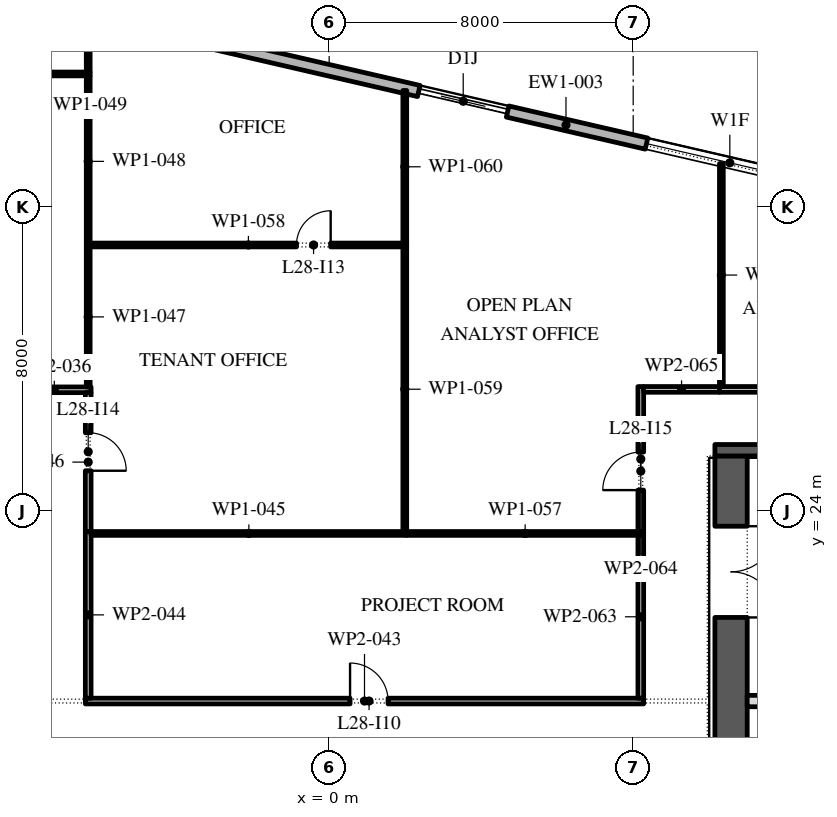
"""IFC4 building model, lengths in metres.
Left out: names, types, materials, properties, quantities, classifications, styles, units other than length and angle.
Written with IfcOpenShell. Run it as: python <this file> out.ifc"""

import sys

from ifc_helpers import new_model, si_unit, direction, frame, frame_2d, origin, place, context, subcontext, project, spatial, rectangle, extrude, element, fill, save


model = new_model("IFC4")
c1 = context("Model", 3, precision=1e-05, world=origin(), true_north=direction((0.0, 1.0)))
c2 = subcontext(c1, "Body", "Model", "MODEL_VIEW")
j1 = project(units=[si_unit("LENGTHUNIT", "METRE"), si_unit("PLANEANGLEUNIT", "RADIAN")], contexts=[c1])
p1 = place(None, origin())
s1 = spatial("IfcSite", under=j1, at=p1, CompositionType="ELEMENT")
p2 = place(p1, origin())
s2 = spatial("IfcBuilding", under=s1, at=p2, CompositionType="ELEMENT")
p3 = place(p2, frame((0.0, 0.0, 130.8)))
s3 = spatial("IfcBuildingStorey", under=s2, at=p3, CompositionType="ELEMENT", Elevation=130.8)
p4 = place(p3, frame((31.078, 28.421, 0.0), z_axis=(0.0, 0.0, 1.0), x_axis=(-0.974370456532, 0.224949357493, 0.0)))
e1 = element("IfcWall", 1, at=p4, inside=s3, PredefinedType="STANDARD", context=c2, shape_type="SweptSolid", body=[
    extrude(rectangle(XDim=51.0, YDim=0.3, at=frame_2d((25.5, 0.0))), origin(), (0.0, 0.0, 1.0), 4.0),
])
p5 = place(p4, frame((1.875, 0.0, 0.45)))
e2 = element("IfcOpeningElement", 2, at=p5, cuts=e1, PredefinedType="OPENING", context=c2, shape_type="SweptSolid", body=[
    extrude(rectangle(XDim=4.5, YDim=2.95, at=frame_2d((2.25, 1.475))), frame((0.0, 0.16, 0.0), z_axis=(0.0, -1.0, 0.0), x_axis=(1.0, 0.0, 0.0)), (0.0, 0.0, 1.0), 0.32),
])
p6 = place(p4, frame((10.275, 0.0, 0.45)))
e3 = element("IfcOpeningElement", 3, at=p6, cuts=e1, PredefinedType="OPENING", context=c2, shape_type="SweptSolid", body=[
    extrude(rectangle(XDim=4.5, YDim=2.825, at=frame_2d((2.25, 1.413))), frame((0.0, 0.16, 0.0), z_axis=(0.0, -1.0, 0.0), x_axis=(1.0, 0.0, 0.0)), (0.0, 0.0, 1.0), 0.32),
])
p7 = place(p4, frame((18.825, 0.0, 0.45)))
e4 = element("IfcOpeningElement", 4, at=p7, cuts=e1, PredefinedType="OPENING", context=c2, shape_type="SweptSolid", body=[
    extrude(rectangle(XDim=4.5, YDim=2.8, at=frame_2d((2.25, 1.4))), frame((0.0, 0.16, 0.0), z_axis=(0.0, -1.0, 0.0), x_axis=(1.0, 0.0, 0.0)), (0.0, 0.0, 1.0), 0.32),
])
p8 = place(p4, frame((27.075, 0.0, 0.0)))
e5 = element("IfcOpeningElement", 5, at=p8, cuts=e1, PredefinedType="OPENING", context=c2, shape_type="SweptSolid", body=[
    extrude(rectangle(XDim=2.4, YDim=3.125, at=frame_2d((1.2, 1.562))), frame((0.0, 0.16, 0.0), z_axis=(0.0, -1.0, 0.0), x_axis=(1.0, 0.0, 0.0)), (0.0, 0.0, 1.0), 0.32),
])
p9 = place(p4, frame((35.925, 0.0, 0.45)))
e6 = element("IfcOpeningElement", 6, at=p9, cuts=e1, PredefinedType="OPENING", context=c2, shape_type="SweptSolid", body=[
    extrude(rectangle(XDim=4.5, YDim=2.575, at=frame_2d((2.25, 1.288))), frame((0.0, 0.16, 0.0), z_axis=(0.0, -1.0, 0.0), x_axis=(1.0, 0.0, 0.0)), (0.0, 0.0, 1.0), 0.32),
])
p10 = place(p4, frame((44.475, 0.0, 0.45)))
e7 = element("IfcOpeningElement", 7, at=p10, cuts=e1, PredefinedType="OPENING", context=c2, shape_type="SweptSolid", body=[
    extrude(rectangle(XDim=4.5, YDim=2.45, at=frame_2d((2.25, 1.225))), frame((0.0, 0.16, 0.0), z_axis=(0.0, -1.0, 0.0), x_axis=(1.0, 0.0, 0.0)), (0.0, 0.0, 1.0), 0.32),
])
p11 = place(p3, frame((10.575, -2.45, 0.0), z_axis=(0.0, 0.0, 1.0), x_axis=(0.0, 1.0, 0.0)))
e8 = element("IfcWall", 8, at=p11, inside=s3, PredefinedType="SHEAR", context=c2, shape_type="SweptSolid", body=[
    extrude(rectangle(XDim=27.9, YDim=0.85, at=frame_2d((13.95, 0.0))), origin(), (0.0, 0.0, 1.0), 4.0),
])
p12 = place(p11, frame((23.65, 0.0, 0.0)))
e9 = element("IfcOpeningElement", 9, at=p12, cuts=e8, PredefinedType="OPENING", context=c2, shape_type="SweptSolid", body=[
    extrude(rectangle(XDim=2.4, YDim=2.1, at=frame_2d((1.2, 1.05))), frame((0.0, 0.435, 0.0), z_axis=(0.0, -1.0, 0.0), x_axis=(1.0, 0.0, 0.0)), (0.0, 0.0, 1.0), 0.87),
])
p13 = place(p11, frame((1.087, 0.0, 0.0)))
e10 = element("IfcOpeningElement", 10, at=p13, cuts=e8, PredefinedType="OPENING", context=c2, shape_type="SweptSolid", body=[
    extrude(rectangle(XDim=0.9, YDim=2.1, at=frame_2d((0.45, 1.05))), frame((0.0, 0.435, 0.0), z_axis=(0.0, -1.0, 0.0), x_axis=(1.0, 0.0, 0.0)), (0.0, 0.0, 1.0), 0.87),
])
p14 = place(p11, frame((4.262, 0.0, 0.0)))
e11 = element("IfcOpeningElement", 11, at=p14, cuts=e8, PredefinedType="OPENING", context=c2, shape_type="SweptSolid", body=[
    extrude(rectangle(XDim=1.0, YDim=2.1, at=frame_2d((0.5, 1.05))), frame((0.0, 0.435, 0.0), z_axis=(0.0, -1.0, 0.0), x_axis=(1.0, 0.0, 0.0)), (0.0, 0.0, 1.0), 0.87),
])
p15 = place(p3, frame((10.15, 25.6, 0.0), z_axis=(0.0, 0.0, 1.0), x_axis=(1.0, 0.0, 0.0)))
e12 = element("IfcWall", 12, at=p15, inside=s3, PredefinedType="SHEAR", context=c2, shape_type="SweptSolid", body=[
    extrude(rectangle(XDim=11.7, YDim=0.3, at=frame_2d((5.85, 0.0))), origin(), (0.0, 0.0, 1.0), 4.0),
])
p16 = place(p3, frame((11.0, 19.0, 0.0), z_axis=(0.0, 0.0, 1.0), x_axis=(1.0, 0.0, 0.0)))
e13 = element("IfcWall", 13, at=p16, inside=s3, PredefinedType="PARTITIONING", context=c2, shape_type="SweptSolid", body=[
    extrude(rectangle(XDim=3.0, YDim=0.3, at=frame_2d((1.5, 0.0))), origin(), (0.0, 0.0, 1.0), 4.0),
])
p17 = place(p3, frame((-14.62, 35.5, 0.0), z_axis=(0.0, 0.0, 1.0), x_axis=(1.0, 0.0, 0.0)))
e14 = element("IfcWall", 14, at=p17, inside=s3, PredefinedType="PARTITIONING", context=c2, shape_type="SweptSolid", body=[
    extrude(rectangle(XDim=8.33, YDim=0.1, at=frame_2d((4.165, 0.0))), origin(), (0.0, 0.0, 1.0), 4.0),
])
p18 = place(p17, frame((5.43, 0.0, 0.0)))
e15 = element("IfcOpeningElement", 15, at=p18, cuts=e14, PredefinedType="OPENING", context=c2, shape_type="SweptSolid", body=[
    extrude(rectangle(XDim=0.9, YDim=2.1, at=frame_2d((0.45, 1.05))), frame((0.0, 0.06, 0.0), z_axis=(0.0, -1.0, 0.0), x_axis=(1.0, 0.0, 0.0)), (0.0, 0.0, 1.0), 0.12),
])
p19 = place(p3, frame((-8.2, 27.19, 0.0), z_axis=(0.0, 0.0, 1.0), x_axis=(1.0, 0.0, 0.0)))
e16 = element("IfcWall", 16, at=p19, inside=s3, PredefinedType="PARTITIONING", context=c2, shape_type="SweptSolid", body=[
    extrude(rectangle(XDim=1.935, YDim=0.15, at=frame_2d((0.968, 0.0))), origin(), (0.0, 0.0, 1.0), 4.0),
])
p20 = place(p3, frame((-6.415, 19.0, 0.0), z_axis=(0.0, 0.0, 1.0), x_axis=(1.0, 0.0, 0.0)))
e17 = element("IfcWall", 17, at=p20, inside=s3, PredefinedType="PARTITIONING", context=c2, shape_type="SweptSolid", body=[
    extrude(rectangle(XDim=14.69, YDim=0.15, at=frame_2d((7.345, 0.0))), origin(), (0.0, 0.0, 1.0), 4.0),
])
p21 = place(p20, frame((6.965, 0.0, 0.0)))
e18 = element("IfcOpeningElement", 18, at=p21, cuts=e17, PredefinedType="OPENING", context=c2, shape_type="SweptSolid", body=[
    extrude(rectangle(XDim=1.0, YDim=2.1, at=frame_2d((0.5, 1.05))), frame((0.0, 0.085, 0.0), z_axis=(0.0, -1.0, 0.0), x_axis=(1.0, 0.0, 0.0)), (0.0, 0.0, 1.0), 0.17),
])
p22 = place(p3, frame((-6.34, 23.46, 0.0), z_axis=(0.0, 0.0, 1.0), x_axis=(0.0, -1.0, 0.0)))
e19 = element("IfcWall", 19, at=p22, inside=s3, PredefinedType="PARTITIONING", context=c2, shape_type="SweptSolid", body=[
    extrude(rectangle(XDim=4.385, YDim=0.15, at=frame_2d((2.192, 0.0))), origin(), (0.0, 0.0, 1.0), 4.0),
])
p23 = place(p3, frame((-6.265, 23.41, 0.0), z_axis=(0.0, 0.0, 1.0), x_axis=(1.0, 0.0, 0.0)))
e20 = element("IfcWall", 20, at=p23, inside=s3, PredefinedType="PARTITIONING", context=c2, shape_type="SweptSolid", body=[
    extrude(rectangle(XDim=8.305, YDim=0.1, at=frame_2d((4.152, 0.0))), origin(), (0.0, 0.0, 1.0), 4.0),
])
p24 = place(p3, frame((-6.34, 27.115, 0.0), z_axis=(0.0, 0.0, 1.0), x_axis=(0.0, -1.0, 0.0)))
e21 = element("IfcWall", 21, at=p24, inside=s3, PredefinedType="PARTITIONING", context=c2, shape_type="SweptSolid", body=[
    extrude(rectangle(XDim=3.655, YDim=0.15, at=frame_2d((1.828, 0.0))), origin(), (0.0, 0.0, 1.0), 4.0),
])
p25 = place(p24, frame((1.055, 0.0, 0.0)))
e22 = element("IfcOpeningElement", 22, at=p25, cuts=e21, PredefinedType="OPENING", context=c2, shape_type="SweptSolid", body=[
    extrude(rectangle(XDim=1.0, YDim=2.1, at=frame_2d((0.5, 1.05))), frame((0.0, 0.085, 0.0), z_axis=(0.0, -1.0, 0.0), x_axis=(1.0, 0.0, 0.0)), (0.0, 0.0, 1.0), 0.17),
])
p26 = place(p3, frame((-6.34, 27.265, 0.0), z_axis=(0.0, 0.0, 1.0), x_axis=(0.0, 1.0, 0.0)))
e23 = element("IfcWall", 23, at=p26, inside=s3, PredefinedType="PARTITIONING", context=c2, shape_type="SweptSolid", body=[
    extrude(rectangle(XDim=3.685, YDim=0.1, at=frame_2d((1.843, 0.0))), origin(), (0.0, 0.0, 1.0), 4.0),
])
p27 = place(p3, frame((-6.34, 30.95, 0.0), z_axis=(0.0, 0.0, 1.0), x_axis=(0.0, 1.0, 0.0)))
e24 = element("IfcWall", 24, at=p27, inside=s3, PredefinedType="PARTITIONING", context=c2, shape_type="SweptSolid", body=[
    extrude(rectangle(XDim=4.5, YDim=0.1, at=frame_2d((2.25, 0.0))), origin(), (0.0, 0.0, 1.0), 4.0),
])
p28 = place(p3, frame((-6.34, 35.55, 0.0), z_axis=(0.0, 0.0, 1.0), x_axis=(0.0, 1.0, 0.0)))
e25 = element("IfcWall", 25, at=p28, inside=s3, PredefinedType="PARTITIONING", context=c2, shape_type="SweptSolid", body=[
    extrude(rectangle(XDim=1.438, YDim=0.1, at=frame_2d((0.719, 0.0))), origin(), (0.0, 0.0, 1.0), 4.0),
])
p29 = place(p3, frame((2.04, 23.41, 0.0), z_axis=(0.0, 0.0, 1.0), x_axis=(1.0, 0.0, 0.0)))
e26 = element("IfcWall", 26, at=p29, inside=s3, PredefinedType="PARTITIONING", context=c2, shape_type="SweptSolid", body=[
    extrude(rectangle(XDim=6.235, YDim=0.1, at=frame_2d((3.117, 0.0))), origin(), (0.0, 0.0, 1.0), 4.0),
])
p30 = place(p3, frame((2.04, 31.0, 0.0), z_axis=(0.0, 0.0, 1.0), x_axis=(-1.0, 0.0, 0.0)))
e27 = element("IfcWall", 27, at=p30, inside=s3, PredefinedType="PARTITIONING", context=c2, shape_type="SweptSolid", body=[
    extrude(rectangle(XDim=8.33, YDim=0.1, at=frame_2d((4.165, 0.0))), origin(), (0.0, 0.0, 1.0), 4.0),
])
p31 = place(p30, frame((2.0, 0.0, 0.0)))
e28 = element("IfcOpeningElement", 28, at=p31, cuts=e27, PredefinedType="OPENING", context=c2, shape_type="SweptSolid", body=[
    extrude(rectangle(XDim=0.9, YDim=2.1, at=frame_2d((0.45, 1.05))), frame((0.0, 0.06, 0.0), z_axis=(0.0, -1.0, 0.0), x_axis=(1.0, 0.0, 0.0)), (0.0, 0.0, 1.0), 0.12),
])
p32 = place(p3, frame((1.99, 30.95, 0.0), z_axis=(0.0, 0.0, 1.0), x_axis=(0.0, -1.0, 0.0)))
e29 = element("IfcWall", 29, at=p32, inside=s3, PredefinedType="PARTITIONING", context=c2, shape_type="SweptSolid", body=[
    extrude(rectangle(XDim=7.49, YDim=0.1, at=frame_2d((3.745, 0.0))), origin(), (0.0, 0.0, 1.0), 4.0),
])
p33 = place(p3, frame((1.99, 35.065, 0.0), z_axis=(0.0, 0.0, 1.0), x_axis=(0.0, -1.0, 0.0)))
e30 = element("IfcWall", 30, at=p33, inside=s3, PredefinedType="PARTITIONING", context=c2, shape_type="SweptSolid", body=[
    extrude(rectangle(XDim=4.015, YDim=0.1, at=frame_2d((2.007, 0.0))), origin(), (0.0, 0.0, 1.0), 4.0),
])
p34 = place(p3, frame((8.2, 19.075, 0.0), z_axis=(0.0, 0.0, 1.0), x_axis=(0.0, 1.0, 0.0)))
e31 = element("IfcWall", 31, at=p34, inside=s3, PredefinedType="PARTITIONING", context=c2, shape_type="SweptSolid", body=[
    extrude(rectangle(XDim=4.285, YDim=0.15, at=frame_2d((2.143, 0.0))), origin(), (0.0, 0.0, 1.0), 4.0),
])
p35 = place(p3, frame((8.2, 23.46, 0.0), z_axis=(0.0, 0.0, 1.0), x_axis=(0.0, 1.0, 0.0)))
e32 = element("IfcWall", 32, at=p35, inside=s3, PredefinedType="PARTITIONING", context=c2, shape_type="SweptSolid", body=[
    extrude(rectangle(XDim=3.815, YDim=0.15, at=frame_2d((1.907, 0.0))), origin(), (0.0, 0.0, 1.0), 4.0),
])
p36 = place(p35, frame((1.09, 0.0, 0.0)))
e33 = element("IfcOpeningElement", 33, at=p36, cuts=e32, PredefinedType="OPENING", context=c2, shape_type="SweptSolid", body=[
    extrude(rectangle(XDim=1.0, YDim=2.1, at=frame_2d((0.5, 1.05))), frame((0.0, 0.085, 0.0), z_axis=(0.0, -1.0, 0.0), x_axis=(1.0, 0.0, 0.0)), (0.0, 0.0, 1.0), 0.17),
])
p37 = place(p3, frame((8.275, 27.2, 0.0), z_axis=(0.0, 0.0, 1.0), x_axis=(1.0, 0.0, 0.0)))
e34 = element("IfcWall", 34, at=p37, inside=s3, PredefinedType="PARTITIONING", context=c2, shape_type="SweptSolid", body=[
    extrude(rectangle(XDim=1.995, YDim=0.15, at=frame_2d((0.998, 0.0))), origin(), (0.0, 0.0, 1.0), 4.0),
])
p38 = place(p3, frame((10.27, 27.2, 0.0), z_axis=(0.0, 0.0, 1.0), x_axis=(1.0, 0.0, 0.0)))
e35 = element("IfcWall", 35, at=p38, inside=s3, PredefinedType="PARTITIONING", context=c2, shape_type="SweptSolid", body=[
    extrude(rectangle(XDim=12.79, YDim=0.15, at=frame_2d((6.395, 0.0))), origin(), (0.0, 0.0, 1.0), 4.0),
])
p39 = place(p38, frame((7.09, 0.0, 0.0)))
e36 = element("IfcOpeningElement", 36, at=p39, cuts=e35, PredefinedType="OPENING", context=c2, shape_type="SweptSolid", body=[
    extrude(rectangle(XDim=1.0, YDim=2.1, at=frame_2d((0.5, 1.05))), frame((0.0, 0.085, 0.0), z_axis=(0.0, -1.0, 0.0), x_axis=(1.0, 0.0, 0.0)), (0.0, 0.0, 1.0), 0.17),
])
p40 = place(p3, frame((10.32, 33.142, 0.0), z_axis=(0.0, 0.0, 1.0), x_axis=(0.0, -1.0, 0.0)))
e37 = element("IfcWall", 37, at=p40, inside=s3, PredefinedType="PARTITIONING", context=c2, shape_type="SweptSolid", body=[
    extrude(rectangle(XDim=5.867, YDim=0.1, at=frame_2d((2.934, 0.0))), origin(), (0.0, 0.0, 1.0), 4.0),
])
p41 = place(p7, origin())
e38 = element("IfcWindow", 38, at=p41, inside=s3, PartitioningType="DOUBLE_PANEL_VERTICAL", PredefinedType="WINDOW", context=c2, shape_type="SweptSolid", body=[
    extrude(rectangle(XDim=4.5, YDim=2.8, at=frame_2d((2.25, 1.4))), frame((0.0, 0.03, 0.0), z_axis=(0.0, -1.0, 0.0), x_axis=(1.0, 0.0, 0.0)), (0.0, 0.0, 1.0), 0.06),
])
fill(e4, e38)
p42 = place(p8, origin())
e39 = element("IfcDoor", 39, at=p42, inside=s3, OperationType="DOUBLE_DOOR_SLIDING", PredefinedType="DOOR", context=c2, shape_type="SweptSolid", body=[
    extrude(rectangle(XDim=2.4, YDim=3.125, at=frame_2d((1.2, 1.562))), frame((0.0, 0.025, 0.0), z_axis=(0.0, -1.0, 0.0), x_axis=(1.0, 0.0, 0.0)), (0.0, 0.0, 1.0), 0.05),
])
fill(e5, e39)
p43 = place(p12, frame((2.4, 0.0, 0.0), z_axis=(0.0, 0.0, 1.0), x_axis=(-1.0, 0.0, 0.0)))
e40 = element("IfcDoor", 40, at=p43, inside=s3, OperationType="DOUBLE_DOOR_SINGLE_SWING", PredefinedType="DOOR", context=c2, shape_type="SweptSolid", body=[
    extrude(rectangle(XDim=2.4, YDim=2.1, at=frame_2d((1.2, 1.05))), frame((0.0, 0.025, 0.0), z_axis=(0.0, -1.0, 0.0), x_axis=(1.0, 0.0, 0.0)), (0.0, 0.0, 1.0), 0.05),
])
fill(e9, e40)
p44 = place(p21, origin())
e41 = element("IfcDoor", 41, at=p44, inside=s3, OperationType="SINGLE_SWING_RIGHT", PredefinedType="DOOR", context=c2, shape_type="SweptSolid", body=[
    extrude(rectangle(XDim=1.0, YDim=2.1, at=frame_2d((0.5, 1.05))), frame((0.0, 0.025, 0.0), z_axis=(0.0, -1.0, 0.0), x_axis=(1.0, 0.0, 0.0)), (0.0, 0.0, 1.0), 0.05),
])
fill(e18, e41)
p45 = place(p31, frame((0.9, 0.0, 0.0), z_axis=(0.0, 0.0, 1.0), x_axis=(-1.0, 0.0, 0.0)))
e42 = element("IfcDoor", 42, at=p45, inside=s3, OperationType="SINGLE_SWING_LEFT", PredefinedType="DOOR", context=c2, shape_type="SweptSolid", body=[
    extrude(rectangle(XDim=0.9, YDim=2.1, at=frame_2d((0.45, 1.05))), frame((0.0, 0.025, 0.0), z_axis=(0.0, -1.0, 0.0), x_axis=(1.0, 0.0, 0.0)), (0.0, 0.0, 1.0), 0.05),
])
fill(e28, e42)
p46 = place(p25, origin())
e43 = element("IfcDoor", 43, at=p46, inside=s3, OperationType="SINGLE_SWING_LEFT", PredefinedType="DOOR", context=c2, shape_type="SweptSolid", body=[
    extrude(rectangle(XDim=1.0, YDim=2.1, at=frame_2d((0.5, 1.05))), frame((0.0, 0.025, 0.0), z_axis=(0.0, -1.0, 0.0), x_axis=(1.0, 0.0, 0.0)), (0.0, 0.0, 1.0), 0.05),
])
fill(e22, e43)
p47 = place(p36, origin())
e44 = element("IfcDoor", 44, at=p47, inside=s3, OperationType="SINGLE_SWING_RIGHT", PredefinedType="DOOR", context=c2, shape_type="SweptSolid", body=[
    extrude(rectangle(XDim=1.0, YDim=2.1, at=frame_2d((0.5, 1.05))), frame((0.0, 0.025, 0.0), z_axis=(0.0, -1.0, 0.0), x_axis=(1.0, 0.0, 0.0)), (0.0, 0.0, 1.0), 0.05),
])
fill(e33, e44)
save(model, sys.argv[1])
